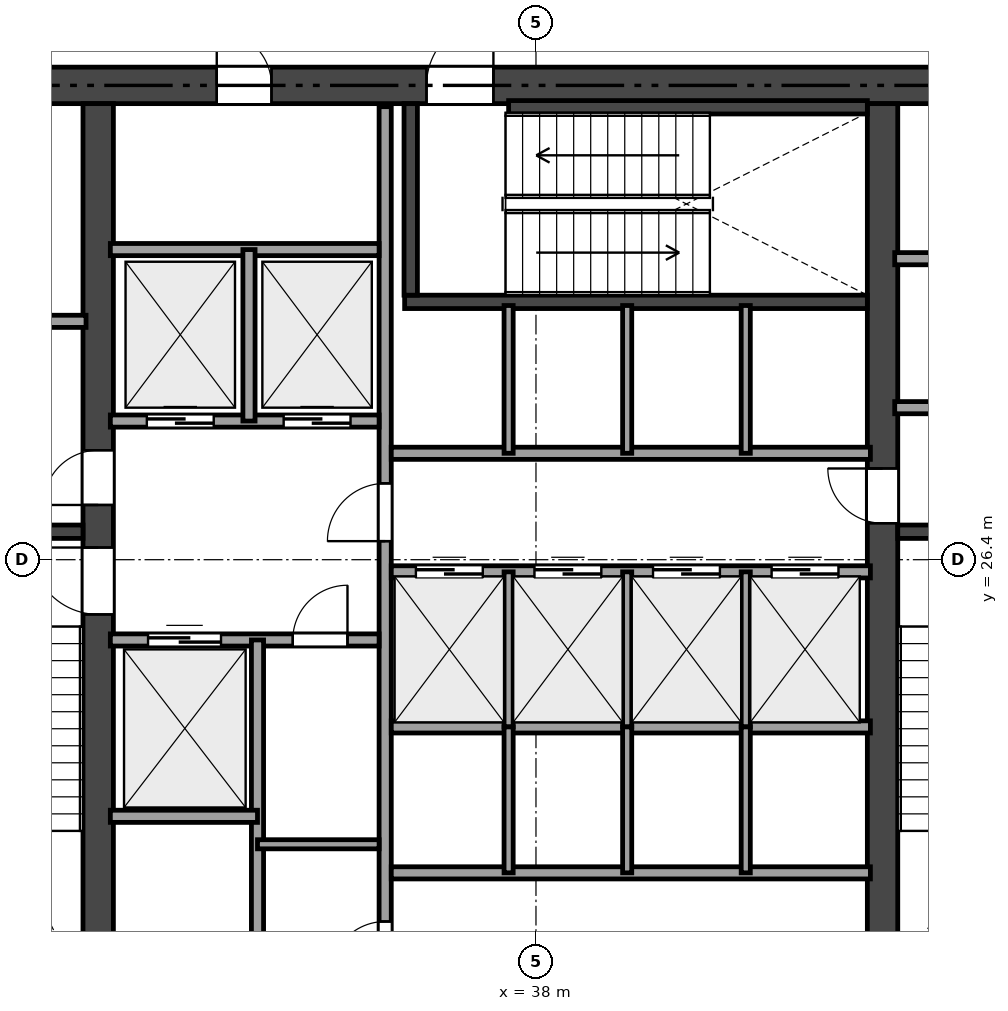
"""IFC4 building model, lengths in metres.
Left out: names, types, materials, properties, quantities, classifications, styles, units other than length and angle.
Written with IfcOpenShell. Run it as: python <this file> out.ifc"""

import sys

from ifc_helpers import new_model, si_unit, direction, frame, frame_2d, origin, place, context, subcontext, project, spatial, rectangle, extrude, element, fill, save


model = new_model("IFC4")
c1 = context("Model", 3, precision=1e-05, world=origin(), true_north=direction((0.0, 1.0)))
c2 = subcontext(c1, "Body", "Model", "MODEL_VIEW")
j1 = project(units=[si_unit("LENGTHUNIT", "METRE"), si_unit("PLANEANGLEUNIT", "RADIAN")], contexts=[c1])
p1 = place(None, origin())
s1 = spatial("IfcSite", under=j1, at=p1, CompositionType="ELEMENT")
p2 = place(p1, origin())
s2 = spatial("IfcBuilding", under=s1, at=p2, CompositionType="ELEMENT")
p3 = place(p2, frame((0.0, 0.0, 121.2)))
s3 = spatial("IfcBuildingStorey", under=s2, at=p3, CompositionType="ELEMENT", Elevation=121.2)
p4 = place(p3, frame((26.5, 34.2, 0.0), z_axis=(0.0, 0.0, 1.0), x_axis=(1.0, 0.0, 0.0)))
e1 = element("IfcWall", 1, at=p4, inside=s3, PredefinedType="SHEAR", context=c2, shape_type="SweptSolid", body=[
    extrude(rectangle(XDim=21.4, YDim=0.6, at=frame_2d((10.7, 0.0))), origin(), (0.0, 0.0, 1.0), 4.08),
])
p5 = place(p4, frame((9.7, 0.0, 0.0)))
e2 = element("IfcOpeningElement", 2, at=p5, cuts=e1, PredefinedType="OPENING", context=c2, shape_type="SweptSolid", body=[
    extrude(rectangle(XDim=1.1, YDim=2.15, at=frame_2d((0.55, 1.075))), frame((0.0, 0.31, 0.0), z_axis=(0.0, -1.0, 0.0), x_axis=(1.0, 0.0, 0.0)), (0.0, 0.0, 1.0), 0.62),
])
p6 = place(p4, frame((1.95, 0.0, 0.0)))
e3 = element("IfcOpeningElement", 3, at=p6, cuts=e1, PredefinedType="OPENING", context=c2, shape_type="SweptSolid", body=[
    extrude(rectangle(XDim=0.9, YDim=2.1, at=frame_2d((0.45, 1.05))), frame((0.0, 0.31, 0.0), z_axis=(0.0, -1.0, 0.0), x_axis=(1.0, 0.0, 0.0)), (0.0, 0.0, 1.0), 0.62),
])
p7 = place(p4, frame((6.25, 0.0, 0.0)))
e4 = element("IfcOpeningElement", 4, at=p7, cuts=e1, PredefinedType="OPENING", context=c2, shape_type="SweptSolid", body=[
    extrude(rectangle(XDim=0.9, YDim=2.1, at=frame_2d((0.45, 1.05))), frame((0.0, 0.31, 0.0), z_axis=(0.0, -1.0, 0.0), x_axis=(1.0, 0.0, 0.0)), (0.0, 0.0, 1.0), 0.62),
])
p8 = place(p3, frame((30.8, 18.9, 0.0), z_axis=(0.0, 0.0, 1.0), x_axis=(0.0, 1.0, 0.0)))
e5 = element("IfcWall", 5, at=p8, inside=s3, PredefinedType="SHEAR", context=c2, shape_type="SweptSolid", body=[
    extrude(rectangle(XDim=15.0, YDim=0.5, at=frame_2d((7.5, 0.0))), origin(), (0.0, 0.0, 1.0), 4.08),
])
p9 = place(p8, frame((6.6, 0.0, 0.0)))
e6 = element("IfcOpeningElement", 6, at=p9, cuts=e5, PredefinedType="OPENING", context=c2, shape_type="SweptSolid", body=[
    extrude(rectangle(XDim=1.1, YDim=2.15, at=frame_2d((0.55, 1.075))), frame((0.0, 0.26, 0.0), z_axis=(0.0, -1.0, 0.0), x_axis=(1.0, 0.0, 0.0)), (0.0, 0.0, 1.0), 0.52),
])
p10 = place(p8, frame((8.4, 0.0, 0.0)))
e7 = element("IfcOpeningElement", 7, at=p10, cuts=e5, PredefinedType="OPENING", context=c2, shape_type="SweptSolid", body=[
    extrude(rectangle(XDim=0.9, YDim=2.1, at=frame_2d((0.45, 1.05))), frame((0.0, 0.26, 0.0), z_axis=(0.0, -1.0, 0.0), x_axis=(1.0, 0.0, 0.0)), (0.0, 0.0, 1.0), 0.52),
])
p11 = place(p3, frame((43.7, 18.9, 0.0), z_axis=(0.0, 0.0, 1.0), x_axis=(0.0, 1.0, 0.0)))
e8 = element("IfcWall", 8, at=p11, inside=s3, PredefinedType="SHEAR", context=c2, shape_type="SweptSolid", body=[
    extrude(rectangle(XDim=15.0, YDim=0.5, at=frame_2d((7.5, 0.0))), origin(), (0.0, 0.0, 1.0), 4.08),
])
p12 = place(p11, frame((8.1, 0.0, 0.0)))
e9 = element("IfcOpeningElement", 9, at=p12, cuts=e8, PredefinedType="OPENING", context=c2, shape_type="SweptSolid", body=[
    extrude(rectangle(XDim=0.9, YDim=2.1, at=frame_2d((0.45, 1.05))), frame((0.0, 0.26, 0.0), z_axis=(0.0, -1.0, 0.0), x_axis=(1.0, 0.0, 0.0)), (0.0, 0.0, 1.0), 0.52),
])
p13 = place(p3, frame((27.1, 26.86, 0.0), z_axis=(0.0, 0.0, 1.0), x_axis=(1.0, 0.0, 0.0)))
e10 = element("IfcWall", 10, at=p13, inside=s3, PredefinedType="SHEAR", context=c2, shape_type="SweptSolid", body=[
    extrude(rectangle(XDim=3.45, YDim=0.22, at=frame_2d((1.725, 0.0))), origin(), (0.0, 0.0, 1.0), 4.08),
])
p14 = place(p3, frame((43.95, 26.86, 0.0), z_axis=(0.0, 0.0, 1.0), x_axis=(1.0, 0.0, 0.0)))
e11 = element("IfcWall", 11, at=p14, inside=s3, PredefinedType="SHEAR", context=c2, shape_type="SweptSolid", body=[
    extrude(rectangle(XDim=3.35, YDim=0.22, at=frame_2d((1.675, 0.0))), origin(), (0.0, 0.0, 1.0), 4.08),
])
p15 = place(p3, frame((35.84, 30.64, 0.0), z_axis=(0.0, 0.0, 1.0), x_axis=(1.0, 0.0, 0.0)))
e12 = element("IfcWall", 12, at=p15, inside=s3, PredefinedType="SHEAR", context=c2, shape_type="SweptSolid", body=[
    extrude(rectangle(XDim=7.61, YDim=0.22, at=frame_2d((3.805, 0.0))), origin(), (0.0, 0.0, 1.0), 4.08),
])
p16 = place(p3, frame((35.94, 30.75, 0.0), z_axis=(0.0, 0.0, 1.0), x_axis=(0.0, 1.0, 0.0)))
e13 = element("IfcWall", 13, at=p16, inside=s3, PredefinedType="SHEAR", context=c2, shape_type="SweptSolid", body=[
    extrude(rectangle(XDim=3.15, YDim=0.22, at=frame_2d((1.575, 0.0))), origin(), (0.0, 0.0, 1.0), 4.08),
])
p17 = place(p3, frame((37.55, 33.84, 0.0), z_axis=(0.0, 0.0, 1.0), x_axis=(1.0, 0.0, 0.0)))
e14 = element("IfcWall", 14, at=p17, inside=s3, PredefinedType="SHEAR", context=c2, shape_type="SweptSolid", body=[
    extrude(rectangle(XDim=5.9, YDim=0.22, at=frame_2d((2.95, 0.0))), origin(), (0.0, 0.0, 1.0), 4.08),
])
p18 = place(p3, frame((27.15, 30.32, 0.0), z_axis=(0.0, 0.0, 1.0), x_axis=(1.0, 0.0, 0.0)))
e15 = element("IfcWall", 15, at=p18, inside=s3, PredefinedType="SOLIDWALL", context=c2, shape_type="SweptSolid", body=[
    extrude(rectangle(XDim=3.45, YDim=0.2, at=frame_2d((1.725, 0.0))), origin(), (0.0, 0.0, 1.0), 4.08),
])
p19 = place(p3, frame((43.9, 28.9, 0.0), z_axis=(0.0, 0.0, 1.0), x_axis=(1.0, 0.0, 0.0)))
e16 = element("IfcWall", 16, at=p19, inside=s3, PredefinedType="SOLIDWALL", context=c2, shape_type="SweptSolid", body=[
    extrude(rectangle(XDim=3.35, YDim=0.2, at=frame_2d((1.675, 0.0))), origin(), (0.0, 0.0, 1.0), 4.08),
])
p20 = place(p19, frame((1.15, 0.0, 0.0)))
e17 = element("IfcOpeningElement", 17, at=p20, cuts=e16, PredefinedType="OPENING", context=c2, shape_type="SweptSolid", body=[
    extrude(rectangle(XDim=0.9, YDim=2.1, at=frame_2d((0.45, 1.05))), frame((0.0, 0.11, 0.0), z_axis=(0.0, -1.0, 0.0), x_axis=(1.0, 0.0, 0.0)), (0.0, 0.0, 1.0), 0.22),
])
p21 = place(p3, frame((43.9, 31.35, 0.0), z_axis=(0.0, 0.0, 1.0), x_axis=(1.0, 0.0, 0.0)))
e18 = element("IfcWall", 18, at=p21, inside=s3, PredefinedType="SOLIDWALL", context=c2, shape_type="SweptSolid", body=[
    extrude(rectangle(XDim=3.35, YDim=0.2, at=frame_2d((1.675, 0.0))), origin(), (0.0, 0.0, 1.0), 4.08),
])
p22 = place(p3, frame((35.52, 18.95, 0.0), z_axis=(0.0, 0.0, 1.0), x_axis=(0.0, 1.0, 0.0)))
e19 = element("IfcWall", 19, at=p22, inside=s3, PredefinedType="SOLIDWALL", context=c2, shape_type="SweptSolid", body=[
    extrude(rectangle(XDim=14.9, YDim=0.2, at=frame_2d((7.45, 0.0))), origin(), (0.0, 0.0, 1.0), 3.601),
])
p23 = place(p22, frame((7.755, 0.0, 0.0)))
e20 = element("IfcOpeningElement", 20, at=p23, cuts=e19, PredefinedType="OPENING", context=c2, shape_type="SweptSolid", body=[
    extrude(rectangle(XDim=0.95, YDim=2.15, at=frame_2d((0.475, 1.075))), frame((0.0, 0.11, 0.0), z_axis=(0.0, -1.0, 0.0), x_axis=(1.0, 0.0, 0.0)), (0.0, 0.0, 1.0), 0.22),
])
p24 = place(p22, frame((0.6, 0.0, 0.0)))
e21 = element("IfcOpeningElement", 21, at=p24, cuts=e19, PredefinedType="OPENING", context=c2, shape_type="SweptSolid", body=[
    extrude(rectangle(XDim=0.9, YDim=2.1, at=frame_2d((0.45, 1.05))), frame((0.0, 0.11, 0.0), z_axis=(0.0, -1.0, 0.0), x_axis=(1.0, 0.0, 0.0)), (0.0, 0.0, 1.0), 0.22),
])
p25 = place(p3, frame((31.0, 28.68, 0.0), z_axis=(0.0, 0.0, 1.0), x_axis=(1.0, 0.0, 0.0)))
e22 = element("IfcWall", 22, at=p25, inside=s3, PredefinedType="SOLIDWALL", context=c2, shape_type="SweptSolid", body=[
    extrude(rectangle(XDim=4.42, YDim=0.2, at=frame_2d((2.21, 0.0))), origin(), (0.0, 0.0, 1.0), 4.08),
])
p26 = place(p25, frame((0.6, 0.0, 0.0)))
e23 = element("IfcOpeningElement", 23, at=p26, cuts=e22, PredefinedType="OPENING", context=c2, shape_type="SweptSolid", body=[
    extrude(rectangle(XDim=1.1, YDim=2.15, at=frame_2d((0.55, 1.075))), frame((0.0, 0.11, 0.0), z_axis=(0.0, -1.0, 0.0), x_axis=(1.0, 0.0, 0.0)), (0.0, 0.0, 1.0), 0.22),
])
p27 = place(p25, frame((2.85, 0.0, 0.0)))
e24 = element("IfcOpeningElement", 24, at=p27, cuts=e22, PredefinedType="OPENING", context=c2, shape_type="SweptSolid", body=[
    extrude(rectangle(XDim=1.1, YDim=2.15, at=frame_2d((0.55, 1.075))), frame((0.0, 0.11, 0.0), z_axis=(0.0, -1.0, 0.0), x_axis=(1.0, 0.0, 0.0)), (0.0, 0.0, 1.0), 0.22),
])
p28 = place(p3, frame((31.0, 31.5, 0.0), z_axis=(0.0, 0.0, 1.0), x_axis=(1.0, 0.0, 0.0)))
e25 = element("IfcWall", 25, at=p28, inside=s3, PredefinedType="SOLIDWALL", context=c2, shape_type="SweptSolid", body=[
    extrude(rectangle(XDim=4.42, YDim=0.2, at=frame_2d((2.21, 0.0))), origin(), (0.0, 0.0, 1.0), 4.08),
])
p29 = place(p3, frame((33.28, 28.68, 0.0), z_axis=(0.0, 0.0, 1.0), x_axis=(0.0, 1.0, 0.0)))
e26 = element("IfcWall", 26, at=p29, inside=s3, PredefinedType="SOLIDWALL", context=c2, shape_type="SweptSolid", body=[
    extrude(rectangle(XDim=2.82, YDim=0.2, at=frame_2d((1.41, 0.0))), origin(), (0.0, 0.0, 1.0), 4.08),
])
p30 = place(p3, frame((31.0, 25.08, 0.0), z_axis=(0.0, 0.0, 1.0), x_axis=(1.0, 0.0, 0.0)))
e27 = element("IfcWall", 27, at=p30, inside=s3, PredefinedType="SOLIDWALL", context=c2, shape_type="SweptSolid", body=[
    extrude(rectangle(XDim=4.42, YDim=0.2, at=frame_2d((2.21, 0.0))), origin(), (0.0, 0.0, 1.0), 4.08),
])
p31 = place(p30, frame((3.0, 0.0, 0.0)))
e28 = element("IfcOpeningElement", 28, at=p31, cuts=e27, PredefinedType="OPENING", context=c2, shape_type="SweptSolid", body=[
    extrude(rectangle(XDim=0.9, YDim=2.1, at=frame_2d((0.45, 1.05))), frame((0.0, 0.11, 0.0), z_axis=(0.0, -1.0, 0.0), x_axis=(1.0, 0.0, 0.0)), (0.0, 0.0, 1.0), 0.22),
])
p32 = place(p30, frame((0.62, 0.0, 0.0)))
e29 = element("IfcOpeningElement", 29, at=p32, cuts=e27, PredefinedType="OPENING", context=c2, shape_type="SweptSolid", body=[
    extrude(rectangle(XDim=1.2, YDim=2.15, at=frame_2d((0.6, 1.075))), frame((0.0, 0.11, 0.0), z_axis=(0.0, -1.0, 0.0), x_axis=(1.0, 0.0, 0.0)), (0.0, 0.0, 1.0), 0.22),
])
p33 = place(p3, frame((33.42, 18.95, 0.0), z_axis=(0.0, 0.0, 1.0), x_axis=(0.0, 1.0, 0.0)))
e30 = element("IfcWall", 30, at=p33, inside=s3, PredefinedType="SOLIDWALL", context=c2, shape_type="SweptSolid", body=[
    extrude(rectangle(XDim=6.13, YDim=0.2, at=frame_2d((3.065, 0.0))), origin(), (0.0, 0.0, 1.0), 3.601),
])
p34 = place(p3, frame((31.0, 22.18, 0.0), z_axis=(0.0, 0.0, 1.0), x_axis=(1.0, 0.0, 0.0)))
e31 = element("IfcWall", 31, at=p34, inside=s3, PredefinedType="SOLIDWALL", context=c2, shape_type="SweptSolid", body=[
    extrude(rectangle(XDim=2.42, YDim=0.2, at=frame_2d((1.21, 0.0))), origin(), (0.0, 0.0, 1.0), 4.08),
])
p35 = place(p3, frame((33.42, 21.72, 0.0), z_axis=(0.0, 0.0, 1.0), x_axis=(1.0, 0.0, 0.0)))
e32 = element("IfcWall", 32, at=p35, inside=s3, PredefinedType="PARTITIONING", context=c2, shape_type="SweptSolid", body=[
    extrude(rectangle(XDim=2.0, YDim=0.15, at=frame_2d((1.0, 0.0))), origin(), (0.0, 0.0, 1.0), 4.08),
])
p36 = place(p3, frame((35.62, 28.15, 0.0), z_axis=(0.0, 0.0, 1.0), x_axis=(1.0, 0.0, 0.0)))
e33 = element("IfcWall", 33, at=p36, inside=s3, PredefinedType="SOLIDWALL", context=c2, shape_type="SweptSolid", body=[
    extrude(rectangle(XDim=7.88, YDim=0.2, at=frame_2d((3.94, 0.0))), origin(), (0.0, 0.0, 1.0), 4.08),
])
p37 = place(p3, frame((35.62, 26.2, 0.0), z_axis=(0.0, 0.0, 1.0), x_axis=(1.0, 0.0, 0.0)))
e34 = element("IfcWall", 34, at=p37, inside=s3, PredefinedType="SOLIDWALL", context=c2, shape_type="SweptSolid", body=[
    extrude(rectangle(XDim=7.88, YDim=0.2, at=frame_2d((3.94, 0.0))), origin(), (0.0, 0.0, 1.0), 4.08),
])
p38 = place(p37, frame((0.405, 0.0, 0.0)))
e35 = element("IfcOpeningElement", 35, at=p38, cuts=e34, PredefinedType="OPENING", context=c2, shape_type="SweptSolid", body=[
    extrude(rectangle(XDim=1.1, YDim=2.15, at=frame_2d((0.55, 1.075))), frame((0.0, 0.11, 0.0), z_axis=(0.0, -1.0, 0.0), x_axis=(1.0, 0.0, 0.0)), (0.0, 0.0, 1.0), 0.22),
])
p39 = place(p37, frame((2.355, 0.0, 0.0)))
e36 = element("IfcOpeningElement", 36, at=p39, cuts=e34, PredefinedType="OPENING", context=c2, shape_type="SweptSolid", body=[
    extrude(rectangle(XDim=1.1, YDim=2.15, at=frame_2d((0.55, 1.075))), frame((0.0, 0.11, 0.0), z_axis=(0.0, -1.0, 0.0), x_axis=(1.0, 0.0, 0.0)), (0.0, 0.0, 1.0), 0.22),
])
p40 = place(p37, frame((4.305, 0.0, 0.0)))
e37 = element("IfcOpeningElement", 37, at=p40, cuts=e34, PredefinedType="OPENING", context=c2, shape_type="SweptSolid", body=[
    extrude(rectangle(XDim=1.1, YDim=2.15, at=frame_2d((0.55, 1.075))), frame((0.0, 0.11, 0.0), z_axis=(0.0, -1.0, 0.0), x_axis=(1.0, 0.0, 0.0)), (0.0, 0.0, 1.0), 0.22),
])
p41 = place(p37, frame((6.255, 0.0, 0.0)))
e38 = element("IfcOpeningElement", 38, at=p41, cuts=e34, PredefinedType="OPENING", context=c2, shape_type="SweptSolid", body=[
    extrude(rectangle(XDim=1.1, YDim=2.15, at=frame_2d((0.55, 1.075))), frame((0.0, 0.11, 0.0), z_axis=(0.0, -1.0, 0.0), x_axis=(1.0, 0.0, 0.0)), (0.0, 0.0, 1.0), 0.22),
])
p42 = place(p3, frame((35.62, 23.65, 0.0), z_axis=(0.0, 0.0, 1.0), x_axis=(1.0, 0.0, 0.0)))
e39 = element("IfcWall", 39, at=p42, inside=s3, PredefinedType="SOLIDWALL", context=c2, shape_type="SweptSolid", body=[
    extrude(rectangle(XDim=7.88, YDim=0.2, at=frame_2d((3.94, 0.0))), origin(), (0.0, 0.0, 1.0), 3.601),
])
p43 = place(p3, frame((35.62, 21.25, 0.0), z_axis=(0.0, 0.0, 1.0), x_axis=(1.0, 0.0, 0.0)))
e40 = element("IfcWall", 40, at=p43, inside=s3, PredefinedType="SOLIDWALL", context=c2, shape_type="SweptSolid", body=[
    extrude(rectangle(XDim=7.88, YDim=0.2, at=frame_2d((3.94, 0.0))), origin(), (0.0, 0.0, 1.0), 4.08),
])
for number, where, z_axis, x_axis in (
    (41, (37.55, 28.15, 0.0), (0.0, 0.0, 1.0), (0.0, 1.0, 0.0)),
    (42, (39.5, 28.15, 0.0), (0.0, 0.0, 1.0), (0.0, 1.0, 0.0)),
    (43, (41.45, 28.15, 0.0), (0.0, 0.0, 1.0), (0.0, 1.0, 0.0)),
):
    element("IfcWall", number, at=place(p3, frame(where, z_axis=z_axis, x_axis=x_axis)), inside=s3, PredefinedType="PARTITIONING", context=c2, shape_type="SweptSolid", body=[
        extrude(rectangle(XDim=2.43, YDim=0.15, at=frame_2d((1.215, 0.0))), origin(), (0.0, 0.0, 1.0), 4.08),
    ])
for number, where, z_axis, x_axis in (
    (44, (37.55, 23.65, 0.0), (0.0, 0.0, 1.0), (0.0, 1.0, 0.0)),
    (45, (39.5, 23.65, 0.0), (0.0, 0.0, 1.0), (0.0, 1.0, 0.0)),
    (46, (41.45, 23.65, 0.0), (0.0, 0.0, 1.0), (0.0, 1.0, 0.0)),
):
    element("IfcWall", number, at=place(p3, frame(where, z_axis=z_axis, x_axis=x_axis)), inside=s3, PredefinedType="PARTITIONING", context=c2, shape_type="SweptSolid", body=[
        extrude(rectangle(XDim=2.55, YDim=0.15, at=frame_2d((1.275, 0.0))), origin(), (0.0, 0.0, 1.0), 3.601),
    ])
for number, where, z_axis, x_axis in (
    (47, (37.55, 21.25, 0.0), (0.0, 0.0, 1.0), (0.0, 1.0, 0.0)),
    (48, (39.5, 21.25, 0.0), (0.0, 0.0, 1.0), (0.0, 1.0, 0.0)),
    (49, (41.45, 21.25, 0.0), (0.0, 0.0, 1.0), (0.0, 1.0, 0.0)),
):
    element("IfcWall", number, at=place(p3, frame(where, z_axis=z_axis, x_axis=x_axis)), inside=s3, PredefinedType="PARTITIONING", context=c2, shape_type="SweptSolid", body=[
        extrude(rectangle(XDim=2.4, YDim=0.15, at=frame_2d((1.2, 0.0))), origin(), (0.0, 0.0, 1.0), 3.601),
    ])
p44 = place(p9, origin())
e50 = element("IfcDoor", 50, at=p44, inside=s3, OperationType="SINGLE_SWING_RIGHT", PredefinedType="DOOR", context=c2, shape_type="SweptSolid", body=[
    extrude(rectangle(XDim=1.1, YDim=2.15, at=frame_2d((0.55, 1.075))), frame((0.0, 0.025, 0.0), z_axis=(0.0, -1.0, 0.0), x_axis=(1.0, 0.0, 0.0)), (0.0, 0.0, 1.0), 0.05),
])
fill(e6, e50)
p45 = place(p5, origin())
e51 = element("IfcDoor", 51, at=p45, inside=s3, OperationType="SINGLE_SWING_RIGHT", PredefinedType="DOOR", context=c2, shape_type="SweptSolid", body=[
    extrude(rectangle(XDim=1.1, YDim=2.15, at=frame_2d((0.55, 1.075))), frame((0.0, 0.025, 0.0), z_axis=(0.0, -1.0, 0.0), x_axis=(1.0, 0.0, 0.0)), (0.0, 0.0, 1.0), 0.05),
])
fill(e2, e51)
p46 = place(p23, origin())
e52 = element("IfcDoor", 52, at=p46, inside=s3, OperationType="SINGLE_SWING_LEFT", PredefinedType="DOOR", context=c2, shape_type="SweptSolid", body=[
    extrude(rectangle(XDim=0.95, YDim=2.15, at=frame_2d((0.475, 1.075))), frame((0.0, 0.025, 0.0), z_axis=(0.0, -1.0, 0.0), x_axis=(1.0, 0.0, 0.0)), (0.0, 0.0, 1.0), 0.05),
])
fill(e20, e52)
p47 = place(p12, origin())
e53 = element("IfcDoor", 53, at=p47, inside=s3, OperationType="SINGLE_SWING_RIGHT", PredefinedType="DOOR", context=c2, shape_type="SweptSolid", body=[
    extrude(rectangle(XDim=0.9, YDim=2.1, at=frame_2d((0.45, 1.05))), frame((0.0, 0.025, 0.0), z_axis=(0.0, -1.0, 0.0), x_axis=(1.0, 0.0, 0.0)), (0.0, 0.0, 1.0), 0.05),
])
fill(e9, e53)
p48 = place(p10, origin())
e54 = element("IfcDoor", 54, at=p48, inside=s3, OperationType="SINGLE_SWING_LEFT", PredefinedType="DOOR", context=c2, shape_type="SweptSolid", body=[
    extrude(rectangle(XDim=0.9, YDim=2.1, at=frame_2d((0.45, 1.05))), frame((0.0, 0.025, 0.0), z_axis=(0.0, -1.0, 0.0), x_axis=(1.0, 0.0, 0.0)), (0.0, 0.0, 1.0), 0.05),
])
fill(e7, e54)
p49 = place(p7, origin())
e55 = element("IfcDoor", 55, at=p49, inside=s3, OperationType="SINGLE_SWING_LEFT", PredefinedType="DOOR", context=c2, shape_type="SweptSolid", body=[
    extrude(rectangle(XDim=0.9, YDim=2.1, at=frame_2d((0.45, 1.05))), frame((0.0, 0.025, 0.0), z_axis=(0.0, -1.0, 0.0), x_axis=(1.0, 0.0, 0.0)), (0.0, 0.0, 1.0), 0.05),
])
fill(e4, e55)
p50 = place(p24, origin())
e56 = element("IfcDoor", 56, at=p50, inside=s3, OperationType="SINGLE_SWING_LEFT", PredefinedType="DOOR", context=c2, shape_type="SweptSolid", body=[
    extrude(rectangle(XDim=0.9, YDim=2.1, at=frame_2d((0.45, 1.05))), frame((0.0, 0.025, 0.0), z_axis=(0.0, -1.0, 0.0), x_axis=(1.0, 0.0, 0.0)), (0.0, 0.0, 1.0), 0.05),
])
fill(e21, e56)
p51 = place(p31, origin())
e57 = element("IfcDoor", 57, at=p51, inside=s3, OperationType="SINGLE_SWING_RIGHT", PredefinedType="DOOR", context=c2, shape_type="SweptSolid", body=[
    extrude(rectangle(XDim=0.9, YDim=2.1, at=frame_2d((0.45, 1.05))), frame((0.0, 0.025, 0.0), z_axis=(0.0, -1.0, 0.0), x_axis=(1.0, 0.0, 0.0)), (0.0, 0.0, 1.0), 0.05),
])
fill(e28, e57)
p52 = place(p26, origin())
e58 = element("IfcDoor", 58, at=p52, inside=s3, OperationType="SLIDING_TO_LEFT", PredefinedType="DOOR", context=c2, shape_type="SweptSolid", body=[
    extrude(rectangle(XDim=1.1, YDim=2.15, at=frame_2d((0.55, 1.075))), frame((0.0, 0.025, 0.0), z_axis=(0.0, -1.0, 0.0), x_axis=(1.0, 0.0, 0.0)), (0.0, 0.0, 1.0), 0.05),
])
fill(e23, e58)
p53 = place(p27, origin())
e59 = element("IfcDoor", 59, at=p53, inside=s3, OperationType="SLIDING_TO_LEFT", PredefinedType="DOOR", context=c2, shape_type="SweptSolid", body=[
    extrude(rectangle(XDim=1.1, YDim=2.15, at=frame_2d((0.55, 1.075))), frame((0.0, 0.025, 0.0), z_axis=(0.0, -1.0, 0.0), x_axis=(1.0, 0.0, 0.0)), (0.0, 0.0, 1.0), 0.05),
])
fill(e24, e59)
p54 = place(p32, origin())
e60 = element("IfcDoor", 60, at=p54, inside=s3, OperationType="SLIDING_TO_LEFT", PredefinedType="DOOR", context=c2, shape_type="SweptSolid", body=[
    extrude(rectangle(XDim=1.2, YDim=2.15, at=frame_2d((0.6, 1.075))), frame((0.0, 0.025, 0.0), z_axis=(0.0, -1.0, 0.0), x_axis=(1.0, 0.0, 0.0)), (0.0, 0.0, 1.0), 0.05),
])
fill(e29, e60)
p55 = place(p38, origin())
e61 = element("IfcDoor", 61, at=p55, inside=s3, OperationType="SLIDING_TO_LEFT", PredefinedType="DOOR", context=c2, shape_type="SweptSolid", body=[
    extrude(rectangle(XDim=1.1, YDim=2.15, at=frame_2d((0.55, 1.075))), frame((0.0, 0.025, 0.0), z_axis=(0.0, -1.0, 0.0), x_axis=(1.0, 0.0, 0.0)), (0.0, 0.0, 1.0), 0.05),
])
fill(e35, e61)
p56 = place(p39, origin())
e62 = element("IfcDoor", 62, at=p56, inside=s3, OperationType="SLIDING_TO_LEFT", PredefinedType="DOOR", context=c2, shape_type="SweptSolid", body=[
    extrude(rectangle(XDim=1.1, YDim=2.15, at=frame_2d((0.55, 1.075))), frame((0.0, 0.025, 0.0), z_axis=(0.0, -1.0, 0.0), x_axis=(1.0, 0.0, 0.0)), (0.0, 0.0, 1.0), 0.05),
])
fill(e36, e62)
p57 = place(p40, origin())
e63 = element("IfcDoor", 63, at=p57, inside=s3, OperationType="SLIDING_TO_LEFT", PredefinedType="DOOR", context=c2, shape_type="SweptSolid", body=[
    extrude(rectangle(XDim=1.1, YDim=2.15, at=frame_2d((0.55, 1.075))), frame((0.0, 0.025, 0.0), z_axis=(0.0, -1.0, 0.0), x_axis=(1.0, 0.0, 0.0)), (0.0, 0.0, 1.0), 0.05),
])
fill(e37, e63)
p58 = place(p41, origin())
e64 = element("IfcDoor", 64, at=p58, inside=s3, OperationType="SLIDING_TO_LEFT", PredefinedType="DOOR", context=c2, shape_type="SweptSolid", body=[
    extrude(rectangle(XDim=1.1, YDim=2.15, at=frame_2d((0.55, 1.075))), frame((0.0, 0.025, 0.0), z_axis=(0.0, -1.0, 0.0), x_axis=(1.0, 0.0, 0.0)), (0.0, 0.0, 1.0), 0.05),
])
fill(e38, e64)
save(model, sys.argv[1])
